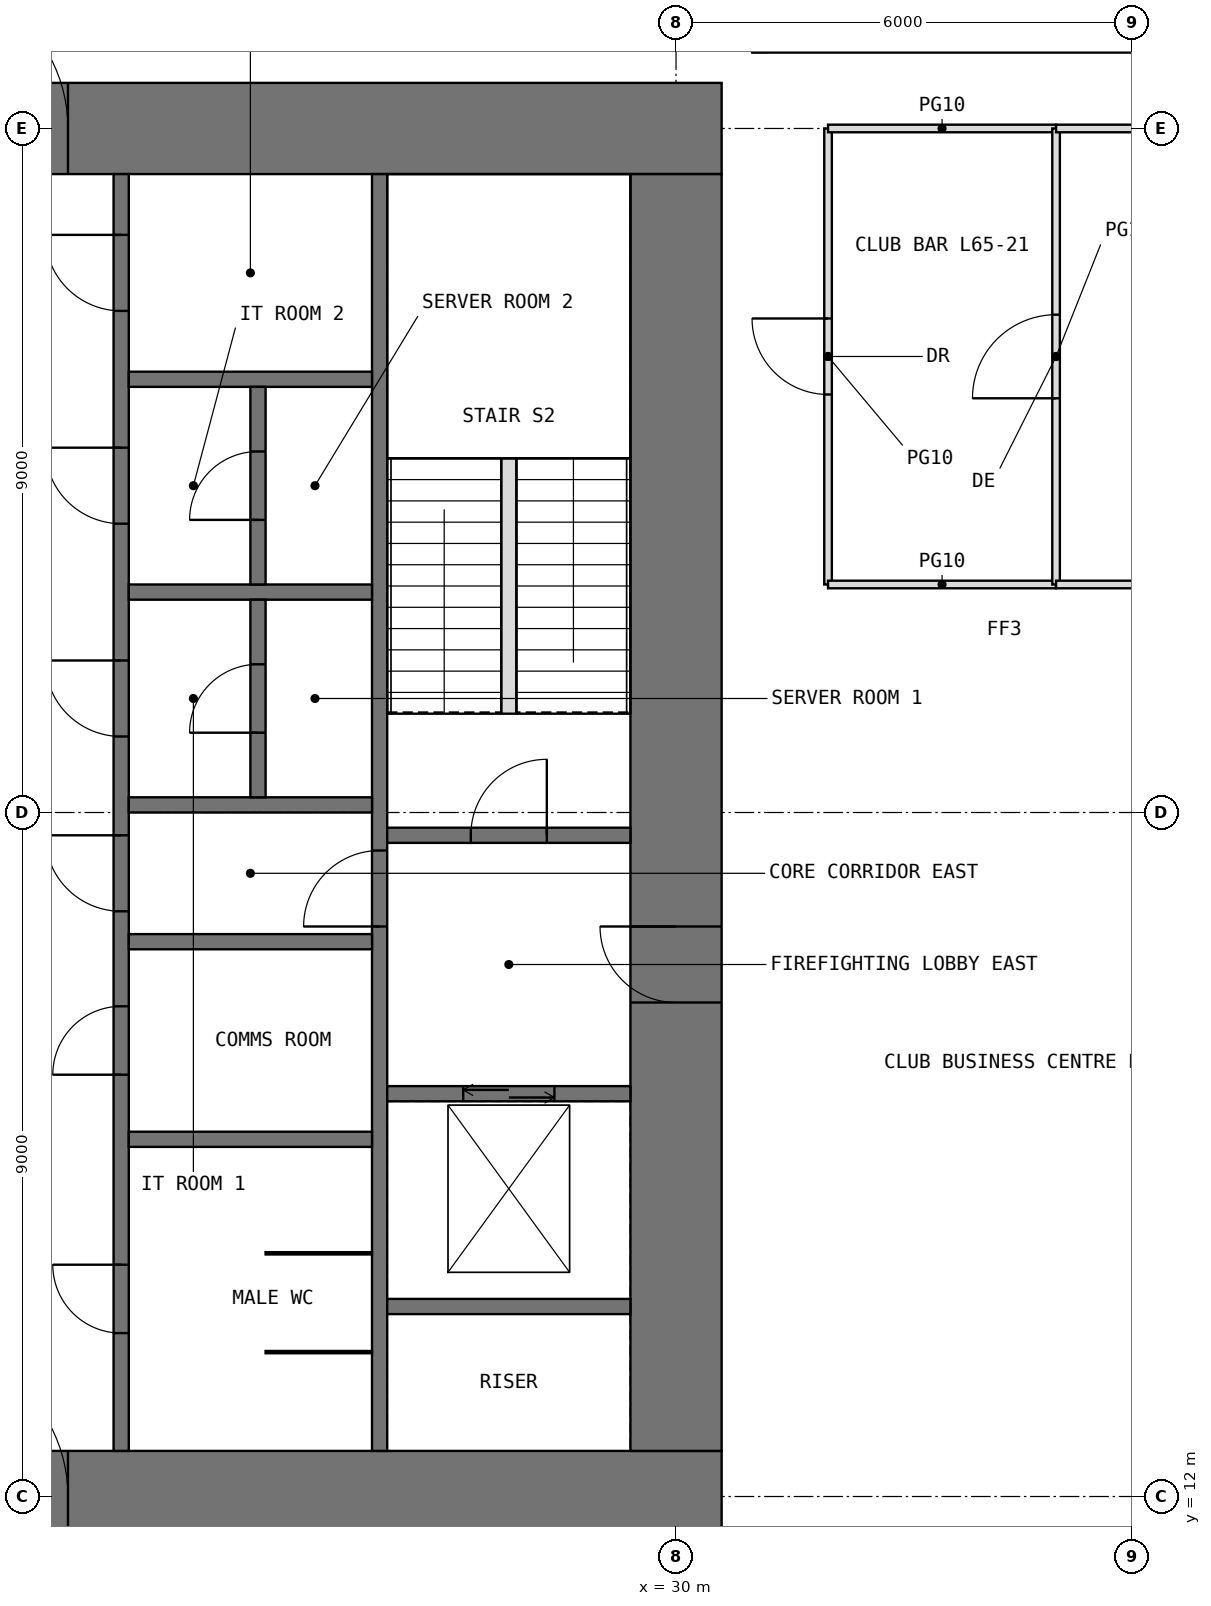
"""IFC4 building model, lengths in metres.
Left out: names, types, materials, properties, quantities, classifications, styles, units other than length and angle.
Written with IfcOpenShell. Run it as: python <this file> out.ifc"""

import sys

from ifc_helpers import new_model, si_unit, direction, frame, frame_2d, origin, place, context, subcontext, project, spatial, rectangle, extrude, element, fill, save


model = new_model("IFC4")
c1 = context("Model", 3, precision=1e-05, world=origin(), true_north=direction((0.0, 1.0)))
c2 = subcontext(c1, "Body", "Model", "MODEL_VIEW")
j1 = project(units=[si_unit("LENGTHUNIT", "METRE"), si_unit("PLANEANGLEUNIT", "RADIAN")], contexts=[c1])
p1 = place(None, origin())
s1 = spatial("IfcSite", under=j1, at=p1, CompositionType="ELEMENT")
p2 = place(p1, origin())
s2 = spatial("IfcBuilding", under=s1, at=p2, CompositionType="ELEMENT")
p3 = place(p2, frame((0.0, 0.0, 273.4)))
s3 = spatial("IfcBuildingStorey", under=s2, at=p3, CompositionType="ELEMENT", Elevation=273.4)
p4 = place(p3, frame((11.4, 12.0, -0.05), z_axis=(0.0, 0.0, 1.0), x_axis=(1.0, 0.0, 0.0)))
e1 = element("IfcWall", 1, at=p4, inside=s3, PredefinedType="SHEAR", context=c2, shape_type="SweptSolid", body=[
    extrude(rectangle(XDim=19.2, YDim=1.2, at=frame_2d((9.6, 0.0))), origin(), (0.0, 0.0, 1.0), 4.45),
])
p5 = place(p4, frame((8.6, 0.0, 0.05)))
e2 = element("IfcOpeningElement", 2, at=p5, cuts=e1, PredefinedType="OPENING", context=c2, shape_type="SweptSolid", body=[
    extrude(rectangle(XDim=2.0, YDim=2.2, at=frame_2d((1.0, 1.1))), frame((0.0, 0.61, 0.0), z_axis=(0.0, -1.0, 0.0), x_axis=(1.0, 0.0, 0.0)), (0.0, 0.0, 1.0), 1.22),
])
p6 = place(p3, frame((11.4, 30.0, -0.05), z_axis=(0.0, 0.0, 1.0), x_axis=(1.0, 0.0, 0.0)))
e3 = element("IfcWall", 3, at=p6, inside=s3, PredefinedType="SHEAR", context=c2, shape_type="SweptSolid", body=[
    extrude(rectangle(XDim=19.2, YDim=1.2, at=frame_2d((9.6, 0.0))), origin(), (0.0, 0.0, 1.0), 4.45),
])
p7 = place(p6, frame((8.6, 0.0, 0.05)))
e4 = element("IfcOpeningElement", 4, at=p7, cuts=e3, PredefinedType="OPENING", context=c2, shape_type="SweptSolid", body=[
    extrude(rectangle(XDim=2.0, YDim=2.2, at=frame_2d((1.0, 1.1))), frame((0.0, 0.61, 0.0), z_axis=(0.0, -1.0, 0.0), x_axis=(1.0, 0.0, 0.0)), (0.0, 0.0, 1.0), 1.22),
])
p8 = place(p3, frame((30.0, 12.6, -0.05), z_axis=(0.0, 0.0, 1.0), x_axis=(0.0, 1.0, 0.0)))
e5 = element("IfcWall", 5, at=p8, inside=s3, PredefinedType="SHEAR", context=c2, shape_type="SweptSolid", body=[
    extrude(rectangle(XDim=16.8, YDim=1.2, at=frame_2d((8.4, 0.0))), origin(), (0.0, 0.0, 1.0), 4.45),
])
p9 = place(p8, frame((5.9, 0.0, 0.05)))
e6 = element("IfcOpeningElement", 6, at=p9, cuts=e5, PredefinedType="OPENING", context=c2, shape_type="SweptSolid", body=[
    extrude(rectangle(XDim=1.0, YDim=2.2, at=frame_2d((0.5, 1.1))), frame((0.0, 0.61, 0.0), z_axis=(0.0, -1.0, 0.0), x_axis=(1.0, 0.0, 0.0)), (0.0, 0.0, 1.0), 1.22),
])
p10 = place(p3, frame((22.7, 12.6, -0.05), z_axis=(0.0, 0.0, 1.0), x_axis=(0.0, 1.0, 0.0)))
e7 = element("IfcWall", 7, at=p10, inside=s3, PredefinedType="SHEAR", context=c2, shape_type="SweptSolid", body=[
    extrude(rectangle(XDim=16.8, YDim=0.2, at=frame_2d((8.4, 0.0))), origin(), (0.0, 0.0, 1.0), 4.45),
])
p11 = place(p10, frame((7.1, 0.0, 0.05)))
e8 = element("IfcOpeningElement", 8, at=p11, cuts=e7, PredefinedType="OPENING", context=c2, shape_type="SweptSolid", body=[
    extrude(rectangle(XDim=1.0, YDim=2.2, at=frame_2d((0.5, 1.1))), frame((0.0, 0.11, 0.0), z_axis=(0.0, -1.0, 0.0), x_axis=(1.0, 0.0, 0.0)), (0.0, 0.0, 1.0), 0.22),
])
p12 = place(p10, frame((1.55, 0.0, 0.05)))
e9 = element("IfcOpeningElement", 9, at=p12, cuts=e7, PredefinedType="OPENING", context=c2, shape_type="SweptSolid", body=[
    extrude(rectangle(XDim=0.9, YDim=2.2, at=frame_2d((0.45, 1.1))), frame((0.0, 0.11, 0.0), z_axis=(0.0, -1.0, 0.0), x_axis=(1.0, 0.0, 0.0)), (0.0, 0.0, 1.0), 0.22),
])
p13 = place(p10, frame((4.95, 0.0, 0.05)))
e10 = element("IfcOpeningElement", 10, at=p13, cuts=e7, PredefinedType="OPENING", context=c2, shape_type="SweptSolid", body=[
    extrude(rectangle(XDim=0.9, YDim=2.2, at=frame_2d((0.45, 1.1))), frame((0.0, 0.11, 0.0), z_axis=(0.0, -1.0, 0.0), x_axis=(1.0, 0.0, 0.0)), (0.0, 0.0, 1.0), 0.22),
])
p14 = place(p10, frame((9.4, 0.0, 0.05)))
e11 = element("IfcOpeningElement", 11, at=p14, cuts=e7, PredefinedType="OPENING", context=c2, shape_type="SweptSolid", body=[
    extrude(rectangle(XDim=1.0, YDim=2.2, at=frame_2d((0.5, 1.1))), frame((0.0, 0.11, 0.0), z_axis=(0.0, -1.0, 0.0), x_axis=(1.0, 0.0, 0.0)), (0.0, 0.0, 1.0), 0.22),
])
p15 = place(p10, frame((12.2, 0.0, 0.05)))
e12 = element("IfcOpeningElement", 12, at=p15, cuts=e7, PredefinedType="OPENING", context=c2, shape_type="SweptSolid", body=[
    extrude(rectangle(XDim=1.0, YDim=2.2, at=frame_2d((0.5, 1.1))), frame((0.0, 0.11, 0.0), z_axis=(0.0, -1.0, 0.0), x_axis=(1.0, 0.0, 0.0)), (0.0, 0.0, 1.0), 0.22),
])
p16 = place(p10, frame((15.0, 0.0, 0.05)))
e13 = element("IfcOpeningElement", 13, at=p16, cuts=e7, PredefinedType="OPENING", context=c2, shape_type="SweptSolid", body=[
    extrude(rectangle(XDim=1.0, YDim=2.2, at=frame_2d((0.5, 1.1))), frame((0.0, 0.11, 0.0), z_axis=(0.0, -1.0, 0.0), x_axis=(1.0, 0.0, 0.0)), (0.0, 0.0, 1.0), 0.22),
])
p17 = place(p3, frame((26.1, 12.6, -0.05), z_axis=(0.0, 0.0, 1.0), x_axis=(0.0, 1.0, 0.0)))
e14 = element("IfcWall", 14, at=p17, inside=s3, PredefinedType="SHEAR", context=c2, shape_type="SweptSolid", body=[
    extrude(rectangle(XDim=16.8, YDim=0.2, at=frame_2d((8.4, 0.0))), origin(), (0.0, 0.0, 1.0), 4.45),
])
p18 = place(p17, frame((6.9, 0.0, 0.05)))
e15 = element("IfcOpeningElement", 15, at=p18, cuts=e14, PredefinedType="OPENING", context=c2, shape_type="SweptSolid", body=[
    extrude(rectangle(XDim=1.0, YDim=2.2, at=frame_2d((0.5, 1.1))), frame((0.0, 0.11, 0.0), z_axis=(0.0, -1.0, 0.0), x_axis=(1.0, 0.0, 0.0)), (0.0, 0.0, 1.0), 0.22),
])
for number, where, z_axis, x_axis in (
    (16, (22.8, 16.7, -0.05), (0.0, 0.0, 1.0), (1.0, 0.0, 0.0)),
    (17, (22.8, 19.3, -0.05), (0.0, 0.0, 1.0), (1.0, 0.0, 0.0)),
    (18, (22.8, 21.1, -0.05), (0.0, 0.0, 1.0), (1.0, 0.0, 0.0)),
    (19, (22.8, 23.9, -0.05), (0.0, 0.0, 1.0), (1.0, 0.0, 0.0)),
    (20, (22.8, 26.7, -0.05), (0.0, 0.0, 1.0), (1.0, 0.0, 0.0)),
    (21, (26.2, 14.5, -0.05), (0.0, 0.0, 1.0), (1.0, 0.0, 0.0)),
):
    element("IfcWall", number, at=place(p3, frame(where, z_axis=z_axis, x_axis=x_axis)), inside=s3, PredefinedType="SHEAR", context=c2, shape_type="SweptSolid", body=[
        extrude(rectangle(XDim=3.2, YDim=0.2, at=frame_2d((1.6, 0.0))), origin(), (0.0, 0.0, 1.0), 4.45),
    ])
p19 = place(p3, frame((26.2, 17.3, -0.05), z_axis=(0.0, 0.0, 1.0), x_axis=(1.0, 0.0, 0.0)))
e22 = element("IfcWall", 22, at=p19, inside=s3, PredefinedType="SHEAR", context=c2, shape_type="SweptSolid", body=[
    extrude(rectangle(XDim=3.2, YDim=0.2, at=frame_2d((1.6, 0.0))), origin(), (0.0, 0.0, 1.0), 4.45),
])
p20 = place(p19, frame((1.0, 0.0, 0.05)))
e23 = element("IfcOpeningElement", 23, at=p20, cuts=e22, PredefinedType="OPENING", context=c2, shape_type="SweptSolid", body=[
    extrude(rectangle(XDim=1.2, YDim=2.2, at=frame_2d((0.6, 1.1))), frame((0.0, 0.11, 0.0), z_axis=(0.0, -1.0, 0.0), x_axis=(1.0, 0.0, 0.0)), (0.0, 0.0, 1.0), 0.22),
])
p21 = place(p3, frame((26.2, 20.7, -0.05), z_axis=(0.0, 0.0, 1.0), x_axis=(1.0, 0.0, 0.0)))
e24 = element("IfcWall", 24, at=p21, inside=s3, PredefinedType="SHEAR", context=c2, shape_type="SweptSolid", body=[
    extrude(rectangle(XDim=3.2, YDim=0.2, at=frame_2d((1.6, 0.0))), origin(), (0.0, 0.0, 1.0), 4.45),
])
p22 = place(p21, frame((1.1, 0.0, 0.05)))
e25 = element("IfcOpeningElement", 25, at=p22, cuts=e24, PredefinedType="OPENING", context=c2, shape_type="SweptSolid", body=[
    extrude(rectangle(XDim=1.0, YDim=2.2, at=frame_2d((0.5, 1.1))), frame((0.0, 0.11, 0.0), z_axis=(0.0, -1.0, 0.0), x_axis=(1.0, 0.0, 0.0)), (0.0, 0.0, 1.0), 0.22),
])
for number, where, z_axis, x_axis in (
    (26, (24.6, 13.9, 0.0), (0.0, 0.0, 1.0), (1.0, 0.0, 0.0)),
    (27, (24.6, 15.2, 0.0), (0.0, 0.0, 1.0), (1.0, 0.0, 0.0)),
):
    element("IfcWall", number, at=place(p3, frame(where, z_axis=z_axis, x_axis=x_axis)), inside=s3, PredefinedType="PARTITIONING", context=c2, shape_type="SweptSolid", body=[
        extrude(rectangle(XDim=1.4, YDim=0.03, at=frame_2d((0.7, 0.0))), origin(), (0.0, 0.0, 1.0), 4.2),
    ])
p23 = place(p3, frame((24.5, 21.2, -0.05), z_axis=(0.0, 0.0, 1.0), x_axis=(0.0, 1.0, 0.0)))
e28 = element("IfcWall", 28, at=p23, inside=s3, PredefinedType="SHEAR", context=c2, shape_type="SweptSolid", body=[
    extrude(rectangle(XDim=2.6, YDim=0.2, at=frame_2d((1.3, 0.0))), origin(), (0.0, 0.0, 1.0), 4.45),
])
p24 = place(p23, frame((0.85, 0.0, 0.05)))
e29 = element("IfcOpeningElement", 29, at=p24, cuts=e28, PredefinedType="OPENING", context=c2, shape_type="SweptSolid", body=[
    extrude(rectangle(XDim=0.9, YDim=2.2, at=frame_2d((0.45, 1.1))), frame((0.0, 0.11, 0.0), z_axis=(0.0, -1.0, 0.0), x_axis=(1.0, 0.0, 0.0)), (0.0, 0.0, 1.0), 0.22),
])
p25 = place(p3, frame((24.5, 24.0, -0.05), z_axis=(0.0, 0.0, 1.0), x_axis=(0.0, 1.0, 0.0)))
e30 = element("IfcWall", 30, at=p25, inside=s3, PredefinedType="SHEAR", context=c2, shape_type="SweptSolid", body=[
    extrude(rectangle(XDim=2.6, YDim=0.2, at=frame_2d((1.3, 0.0))), origin(), (0.0, 0.0, 1.0), 4.45),
])
p26 = place(p25, frame((0.85, 0.0, 0.05)))
e31 = element("IfcOpeningElement", 31, at=p26, cuts=e30, PredefinedType="OPENING", context=c2, shape_type="SweptSolid", body=[
    extrude(rectangle(XDim=0.9, YDim=2.2, at=frame_2d((0.45, 1.1))), frame((0.0, 0.11, 0.0), z_axis=(0.0, -1.0, 0.0), x_axis=(1.0, 0.0, 0.0)), (0.0, 0.0, 1.0), 0.22),
])
p27 = place(p3, frame((32.0, 24.0, 0.0), z_axis=(0.0, 0.0, 1.0), x_axis=(0.0, 1.0, 0.0)))
e32 = element("IfcWall", 32, at=p27, inside=s3, PredefinedType="PARTITIONING", context=c2, shape_type="SweptSolid", body=[
    extrude(rectangle(XDim=6.0, YDim=0.1, at=frame_2d((3.0, 0.0))), origin(), (0.0, 0.0, 1.0), 4.2),
])
p28 = place(p27, frame((2.5, 0.0, 0.0)))
e33 = element("IfcOpeningElement", 33, at=p28, cuts=e32, PredefinedType="OPENING", context=c2, shape_type="SweptSolid", body=[
    extrude(rectangle(XDim=1.0, YDim=2.2, at=frame_2d((0.5, 1.1))), frame((0.0, 0.06, 0.0), z_axis=(0.0, -1.0, 0.0), x_axis=(1.0, 0.0, 0.0)), (0.0, 0.0, 1.0), 0.12),
])
for number, where, z_axis, x_axis in (
    (34, (32.0, 24.0, 0.0), (0.0, 0.0, 1.0), (1.0, 0.0, 0.0)),
    (35, (32.0, 30.0, 0.0), (0.0, 0.0, 1.0), (1.0, 0.0, 0.0)),
):
    element("IfcWall", number, at=place(p3, frame(where, z_axis=z_axis, x_axis=x_axis)), inside=s3, PredefinedType="PARTITIONING", context=c2, shape_type="SweptSolid", body=[
        extrude(rectangle(XDim=3.0, YDim=0.1, at=frame_2d((1.5, 0.0))), origin(), (0.0, 0.0, 1.0), 4.2),
    ])
p29 = place(p3, frame((35.0, 24.0, 0.0), z_axis=(0.0, 0.0, 1.0), x_axis=(0.0, 1.0, 0.0)))
e36 = element("IfcWall", 36, at=p29, inside=s3, PredefinedType="PARTITIONING", context=c2, shape_type="SweptSolid", body=[
    extrude(rectangle(XDim=6.0, YDim=0.1, at=frame_2d((3.0, 0.0))), origin(), (0.0, 0.0, 1.0), 4.2),
])
p30 = place(p29, frame((2.45, 0.0, 0.0)))
e37 = element("IfcOpeningElement", 37, at=p30, cuts=e36, PredefinedType="OPENING", context=c2, shape_type="SweptSolid", body=[
    extrude(rectangle(XDim=1.1, YDim=2.3, at=frame_2d((0.55, 1.15))), frame((0.0, 0.06, 0.0), z_axis=(0.0, -1.0, 0.0), x_axis=(1.0, 0.0, 0.0)), (0.0, 0.0, 1.0), 0.12),
])
for number, where, z_axis, x_axis in (
    (38, (35.0, 24.0, 0.0), (0.0, 0.0, 1.0), (1.0, 0.0, 0.0)),
    (39, (35.0, 30.0, 0.0), (0.0, 0.0, 1.0), (1.0, 0.0, 0.0)),
):
    element("IfcWall", number, at=place(p3, frame(where, z_axis=z_axis, x_axis=x_axis)), inside=s3, PredefinedType="PARTITIONING", context=c2, shape_type="SweptSolid", body=[
        extrude(rectangle(XDim=4.0, YDim=0.1, at=frame_2d((2.0, 0.0))), origin(), (0.0, 0.0, 1.0), 4.2),
    ])
p31 = place(p3, frame((27.8, 22.3, 0.0), z_axis=(0.0, 0.0, 1.0), x_axis=(0.0, 1.0, 0.0)))
e40 = element("IfcWall", 40, at=p31, inside=s3, PredefinedType="PARTITIONING", context=c2, shape_type="SweptSolid", body=[
    extrude(rectangle(XDim=3.36, YDim=0.2, at=frame_2d((1.68, 0.0))), origin(), (0.0, 0.0, 1.0), 4.5),
])
p32 = place(p5, origin())
e41 = element("IfcDoor", 41, at=p32, inside=s3, OperationType="DOUBLE_DOOR_SINGLE_SWING", PredefinedType="DOOR", context=c2, shape_type="SweptSolid", body=[
    extrude(rectangle(XDim=2.0, YDim=2.2, at=frame_2d((1.0, 1.1))), frame((0.0, 0.025, 0.0), z_axis=(0.0, -1.0, 0.0), x_axis=(1.0, 0.0, 0.0)), (0.0, 0.0, 1.0), 0.05),
])
fill(e2, e41)
p33 = place(p7, origin())
e42 = element("IfcDoor", 42, at=p33, inside=s3, OperationType="DOUBLE_DOOR_SINGLE_SWING", PredefinedType="DOOR", context=c2, shape_type="SweptSolid", body=[
    extrude(rectangle(XDim=2.0, YDim=2.2, at=frame_2d((1.0, 1.1))), frame((0.0, 0.025, 0.0), z_axis=(0.0, -1.0, 0.0), x_axis=(1.0, 0.0, 0.0)), (0.0, 0.0, 1.0), 0.05),
])
fill(e4, e42)
p34 = place(p9, origin())
e43 = element("IfcDoor", 43, at=p34, inside=s3, OperationType="SINGLE_SWING_RIGHT", PredefinedType="DOOR", context=c2, shape_type="SweptSolid", body=[
    extrude(rectangle(XDim=1.0, YDim=2.2, at=frame_2d((0.5, 1.1))), frame((0.0, 0.025, 0.0), z_axis=(0.0, -1.0, 0.0), x_axis=(1.0, 0.0, 0.0)), (0.0, 0.0, 1.0), 0.05),
])
fill(e6, e43)
p35 = place(p22, origin())
e44 = element("IfcDoor", 44, at=p35, inside=s3, OperationType="SINGLE_SWING_RIGHT", PredefinedType="DOOR", context=c2, shape_type="SweptSolid", body=[
    extrude(rectangle(XDim=1.0, YDim=2.2, at=frame_2d((0.5, 1.1))), frame((0.0, 0.025, 0.0), z_axis=(0.0, -1.0, 0.0), x_axis=(1.0, 0.0, 0.0)), (0.0, 0.0, 1.0), 0.05),
])
fill(e25, e44)
p36 = place(p18, origin())
e45 = element("IfcDoor", 45, at=p36, inside=s3, OperationType="SINGLE_SWING_LEFT", PredefinedType="DOOR", context=c2, shape_type="SweptSolid", body=[
    extrude(rectangle(XDim=1.0, YDim=2.2, at=frame_2d((0.5, 1.1))), frame((0.0, 0.025, 0.0), z_axis=(0.0, -1.0, 0.0), x_axis=(1.0, 0.0, 0.0)), (0.0, 0.0, 1.0), 0.05),
])
fill(e15, e45)
p37 = place(p11, origin())
e46 = element("IfcDoor", 46, at=p37, inside=s3, OperationType="SINGLE_SWING_RIGHT", PredefinedType="DOOR", context=c2, shape_type="SweptSolid", body=[
    extrude(rectangle(XDim=1.0, YDim=2.2, at=frame_2d((0.5, 1.1))), frame((0.0, 0.025, 0.0), z_axis=(0.0, -1.0, 0.0), x_axis=(1.0, 0.0, 0.0)), (0.0, 0.0, 1.0), 0.05),
])
fill(e8, e46)
p38 = place(p12, origin())
e47 = element("IfcDoor", 47, at=p38, inside=s3, OperationType="SINGLE_SWING_RIGHT", PredefinedType="DOOR", context=c2, shape_type="SweptSolid", body=[
    extrude(rectangle(XDim=0.9, YDim=2.2, at=frame_2d((0.45, 1.1))), frame((0.0, 0.025, 0.0), z_axis=(0.0, -1.0, 0.0), x_axis=(1.0, 0.0, 0.0)), (0.0, 0.0, 1.0), 0.05),
])
fill(e9, e47)
p39 = place(p13, origin())
e48 = element("IfcDoor", 48, at=p39, inside=s3, OperationType="SINGLE_SWING_LEFT", PredefinedType="DOOR", context=c2, shape_type="SweptSolid", body=[
    extrude(rectangle(XDim=0.9, YDim=2.2, at=frame_2d((0.45, 1.1))), frame((0.0, 0.025, 0.0), z_axis=(0.0, -1.0, 0.0), x_axis=(1.0, 0.0, 0.0)), (0.0, 0.0, 1.0), 0.05),
])
fill(e10, e48)
p40 = place(p14, origin())
e49 = element("IfcDoor", 49, at=p40, inside=s3, OperationType="SINGLE_SWING_RIGHT", PredefinedType="DOOR", context=c2, shape_type="SweptSolid", body=[
    extrude(rectangle(XDim=1.0, YDim=2.2, at=frame_2d((0.5, 1.1))), frame((0.0, 0.025, 0.0), z_axis=(0.0, -1.0, 0.0), x_axis=(1.0, 0.0, 0.0)), (0.0, 0.0, 1.0), 0.05),
])
fill(e11, e49)
p41 = place(p24, origin())
e50 = element("IfcDoor", 50, at=p41, inside=s3, OperationType="SINGLE_SWING_LEFT", PredefinedType="DOOR", context=c2, shape_type="SweptSolid", body=[
    extrude(rectangle(XDim=0.9, YDim=2.2, at=frame_2d((0.45, 1.1))), frame((0.0, 0.025, 0.0), z_axis=(0.0, -1.0, 0.0), x_axis=(1.0, 0.0, 0.0)), (0.0, 0.0, 1.0), 0.05),
])
fill(e29, e50)
p42 = place(p15, origin())
e51 = element("IfcDoor", 51, at=p42, inside=s3, OperationType="SINGLE_SWING_RIGHT", PredefinedType="DOOR", context=c2, shape_type="SweptSolid", body=[
    extrude(rectangle(XDim=1.0, YDim=2.2, at=frame_2d((0.5, 1.1))), frame((0.0, 0.025, 0.0), z_axis=(0.0, -1.0, 0.0), x_axis=(1.0, 0.0, 0.0)), (0.0, 0.0, 1.0), 0.05),
])
fill(e12, e51)
p43 = place(p26, origin())
e52 = element("IfcDoor", 52, at=p43, inside=s3, OperationType="SINGLE_SWING_LEFT", PredefinedType="DOOR", context=c2, shape_type="SweptSolid", body=[
    extrude(rectangle(XDim=0.9, YDim=2.2, at=frame_2d((0.45, 1.1))), frame((0.0, 0.025, 0.0), z_axis=(0.0, -1.0, 0.0), x_axis=(1.0, 0.0, 0.0)), (0.0, 0.0, 1.0), 0.05),
])
fill(e31, e52)
p44 = place(p16, origin())
e53 = element("IfcDoor", 53, at=p44, inside=s3, OperationType="SINGLE_SWING_RIGHT", PredefinedType="DOOR", context=c2, shape_type="SweptSolid", body=[
    extrude(rectangle(XDim=1.0, YDim=2.2, at=frame_2d((0.5, 1.1))), frame((0.0, 0.025, 0.0), z_axis=(0.0, -1.0, 0.0), x_axis=(1.0, 0.0, 0.0)), (0.0, 0.0, 1.0), 0.05),
])
fill(e13, e53)
p45 = place(p30, origin())
e54 = element("IfcDoor", 54, at=p45, inside=s3, OperationType="SINGLE_SWING_LEFT", PredefinedType="DOOR", context=c2, shape_type="SweptSolid", body=[
    extrude(rectangle(XDim=1.1, YDim=2.3, at=frame_2d((0.55, 1.15))), frame((0.0, 0.025, 0.0), z_axis=(0.0, -1.0, 0.0), x_axis=(1.0, 0.0, 0.0)), (0.0, 0.0, 1.0), 0.05),
])
fill(e37, e54)
p46 = place(p28, origin())
e55 = element("IfcDoor", 55, at=p46, inside=s3, OperationType="SINGLE_SWING_RIGHT", PredefinedType="DOOR", context=c2, shape_type="SweptSolid", body=[
    extrude(rectangle(XDim=1.0, YDim=2.2, at=frame_2d((0.5, 1.1))), frame((0.0, 0.025, 0.0), z_axis=(0.0, -1.0, 0.0), x_axis=(1.0, 0.0, 0.0)), (0.0, 0.0, 1.0), 0.05),
])
fill(e33, e55)
p47 = place(p20, origin())
e56 = element("IfcDoor", 56, at=p47, inside=s3, OperationType="DOUBLE_DOOR_SLIDING", PredefinedType="DOOR", context=c2, shape_type="SweptSolid", body=[
    extrude(rectangle(XDim=1.2, YDim=2.2, at=frame_2d((0.6, 1.1))), frame((0.0, 0.025, 0.0), z_axis=(0.0, -1.0, 0.0), x_axis=(1.0, 0.0, 0.0)), (0.0, 0.0, 1.0), 0.05),
])
fill(e23, e56)
save(model, sys.argv[1])
